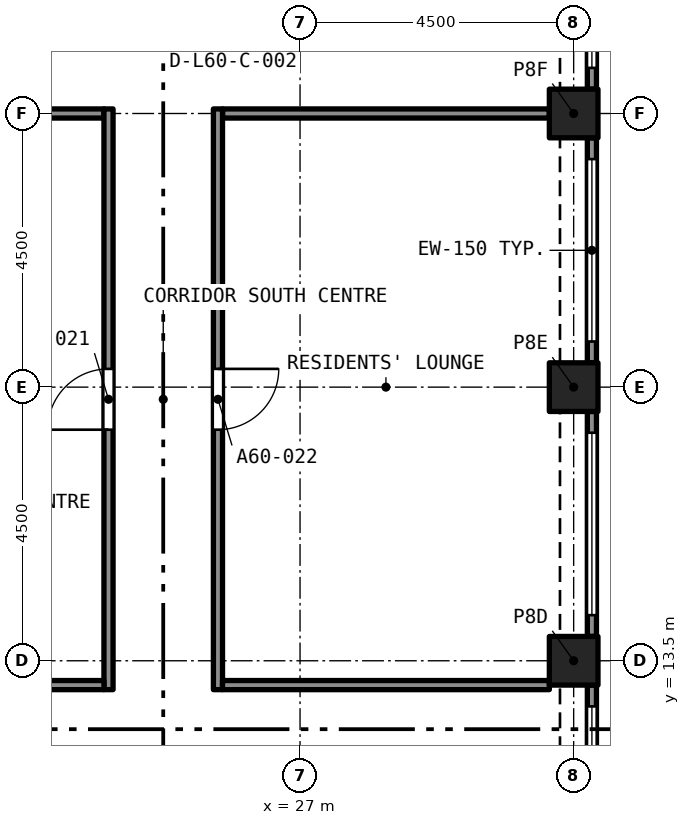
"""IFC4 building model, lengths in metres.
Left out: names, types, materials, properties, quantities, classifications, styles, units other than length and angle.
Written with IfcOpenShell. Run it as: python <this file> out.ifc"""

import sys

from ifc_helpers import new_model, si_unit, direction, frame, frame_2d, origin, origin_2d, place, context, subcontext, project, spatial, rectangle, extrude, element, fill, save


model = new_model("IFC4")
c1 = context("Model", 3, precision=1e-05, world=origin(), true_north=direction((0.0, 1.0)))
c2 = subcontext(c1, "Body", "Model", "MODEL_VIEW")
j1 = project(units=[si_unit("LENGTHUNIT", "METRE"), si_unit("PLANEANGLEUNIT", "RADIAN")], contexts=[c1])
p1 = place(None, origin())
s1 = spatial("IfcSite", under=j1, at=p1, CompositionType="ELEMENT")
p2 = place(p1, origin())
s2 = spatial("IfcBuilding", under=s1, at=p2, CompositionType="ELEMENT")
p3 = place(p2, frame((0.0, 0.0, 216.495)))
s3 = spatial("IfcBuildingStorey", under=s2, at=p3, CompositionType="ELEMENT", Elevation=216.495)
for number, where, z_axis, x_axis in (
    (1, (31.5, 13.5, 0.0), (0.0, 0.0, 1.0), (1.0, 0.0, 0.0)),
    (2, (31.5, 18.0, 0.0), (0.0, 0.0, 1.0), (1.0, 0.0, 0.0)),
    (3, (31.5, 22.5, 0.0), (0.0, 0.0, 1.0), (1.0, 0.0, 0.0)),
):
    element("IfcColumn", number, at=place(p3, frame(where, z_axis=z_axis, x_axis=x_axis)), inside=s3, PredefinedType="COLUMN", context=c2, shape_type="SweptSolid", body=[
        extrude(rectangle(XDim=0.8, YDim=0.8, at=origin_2d()), origin(), (0.0, 0.0, 1.0), 3.2),
    ])
p4 = place(p3, frame((31.8, 13.1, 0.0), z_axis=(0.0, 0.0, 1.0), x_axis=(0.0, -1.0, 0.0)))
e4 = element("IfcWall", 4, at=p4, inside=s3, PredefinedType="SOLIDWALL", context=c2, shape_type="SweptSolid", body=[
    extrude(rectangle(XDim=3.7, YDim=0.15, at=frame_2d((1.85, 0.0))), origin(), (0.0, 0.0, 1.0), 3.2),
])
p5 = place(p4, frame((0.35, 0.0, 0.45)))
e5 = element("IfcOpeningElement", 5, at=p5, cuts=e4, PredefinedType="OPENING", context=c2, shape_type="SweptSolid", body=[
    extrude(rectangle(XDim=3.0, YDim=1.95, at=frame_2d((1.5, 0.975))), frame((0.0, 0.085, 0.0), z_axis=(0.0, -1.0, 0.0), x_axis=(1.0, 0.0, 0.0)), (0.0, 0.0, 1.0), 0.17),
])
p6 = place(p3, frame((31.8, 17.6, 0.0), z_axis=(0.0, 0.0, 1.0), x_axis=(0.0, -1.0, 0.0)))
e6 = element("IfcWall", 6, at=p6, inside=s3, PredefinedType="SOLIDWALL", context=c2, shape_type="SweptSolid", body=[
    extrude(rectangle(XDim=3.7, YDim=0.15, at=frame_2d((1.85, 0.0))), origin(), (0.0, 0.0, 1.0), 3.2),
])
p7 = place(p6, frame((0.35, 0.0, 0.45)))
e7 = element("IfcOpeningElement", 7, at=p7, cuts=e6, PredefinedType="OPENING", context=c2, shape_type="SweptSolid", body=[
    extrude(rectangle(XDim=3.0, YDim=1.95, at=frame_2d((1.5, 0.975))), frame((0.0, 0.085, 0.0), z_axis=(0.0, -1.0, 0.0), x_axis=(1.0, 0.0, 0.0)), (0.0, 0.0, 1.0), 0.17),
])
p8 = place(p3, frame((31.8, 22.1, 0.0), z_axis=(0.0, 0.0, 1.0), x_axis=(0.0, -1.0, 0.0)))
e8 = element("IfcWall", 8, at=p8, inside=s3, PredefinedType="SOLIDWALL", context=c2, shape_type="SweptSolid", body=[
    extrude(rectangle(XDim=3.7, YDim=0.15, at=frame_2d((1.85, 0.0))), origin(), (0.0, 0.0, 1.0), 3.2),
])
p9 = place(p8, frame((0.35, 0.0, 0.45)))
e9 = element("IfcOpeningElement", 9, at=p9, cuts=e8, PredefinedType="OPENING", context=c2, shape_type="SweptSolid", body=[
    extrude(rectangle(XDim=3.0, YDim=1.95, at=frame_2d((1.5, 0.975))), frame((0.0, 0.085, 0.0), z_axis=(0.0, -1.0, 0.0), x_axis=(1.0, 0.0, 0.0)), (0.0, 0.0, 1.0), 0.17),
])
p10 = place(p3, frame((31.8, 26.6, 0.0), z_axis=(0.0, 0.0, 1.0), x_axis=(0.0, -1.0, 0.0)))
e10 = element("IfcWall", 10, at=p10, inside=s3, PredefinedType="SOLIDWALL", context=c2, shape_type="SweptSolid", body=[
    extrude(rectangle(XDim=3.7, YDim=0.15, at=frame_2d((1.85, 0.0))), origin(), (0.0, 0.0, 1.0), 3.2),
])
p11 = place(p10, frame((0.35, 0.0, 0.45)))
e11 = element("IfcOpeningElement", 11, at=p11, cuts=e10, PredefinedType="OPENING", context=c2, shape_type="SweptSolid", body=[
    extrude(rectangle(XDim=3.0, YDim=1.95, at=frame_2d((1.5, 0.975))), frame((0.0, 0.085, 0.0), z_axis=(0.0, -1.0, 0.0), x_axis=(1.0, 0.0, 0.0)), (0.0, 0.0, 1.0), 0.17),
])
for number, where, z_axis, x_axis in (
    (12, (18.4, 22.5, 0.0), (0.0, 0.0, 1.0), (1.0, 0.0, 0.0)),
    (13, (25.725, 22.5, 0.0), (0.0, 0.0, 1.0), (1.0, 0.0, 0.0)),
):
    element("IfcWall", number, at=place(p3, frame(where, z_axis=z_axis, x_axis=x_axis)), inside=s3, PredefinedType="PARTITIONING", context=c2, shape_type="SweptSolid", body=[
        extrude(rectangle(XDim=5.375, YDim=0.15, at=frame_2d((2.688, 0.0))), origin(), (0.0, 0.0, 1.0), 2.75),
    ])
p12 = place(p3, frame((23.85, 13.025, 0.0), z_axis=(0.0, 0.0, 1.0), x_axis=(0.0, 1.0, 0.0)))
e14 = element("IfcWall", 14, at=p12, inside=s3, PredefinedType="PARTITIONING", context=c2, shape_type="SweptSolid", body=[
    extrude(rectangle(XDim=9.55, YDim=0.15, at=frame_2d((4.775, 0.0))), origin(), (0.0, 0.0, 1.0), 2.75),
])
p13 = place(p12, frame((4.275, 0.0, 0.0)))
e15 = element("IfcOpeningElement", 15, at=p13, cuts=e14, PredefinedType="OPENING", context=c2, shape_type="SweptSolid", body=[
    extrude(rectangle(XDim=1.0, YDim=2.1, at=frame_2d((0.5, 1.05))), frame((0.0, 0.085, 0.0), z_axis=(0.0, -1.0, 0.0), x_axis=(1.0, 0.0, 0.0)), (0.0, 0.0, 1.0), 0.17),
])
p14 = place(p3, frame((25.65, 22.575, 0.0), z_axis=(0.0, 0.0, 1.0), x_axis=(0.0, -1.0, 0.0)))
e16 = element("IfcWall", 16, at=p14, inside=s3, PredefinedType="PARTITIONING", context=c2, shape_type="SweptSolid", body=[
    extrude(rectangle(XDim=9.55, YDim=0.15, at=frame_2d((4.775, 0.0))), origin(), (0.0, 0.0, 1.0), 2.75),
])
p15 = place(p14, frame((4.275, 0.0, 0.0)))
e17 = element("IfcOpeningElement", 17, at=p15, cuts=e16, PredefinedType="OPENING", context=c2, shape_type="SweptSolid", body=[
    extrude(rectangle(XDim=1.0, YDim=2.1, at=frame_2d((0.5, 1.05))), frame((0.0, 0.085, 0.0), z_axis=(0.0, -1.0, 0.0), x_axis=(1.0, 0.0, 0.0)), (0.0, 0.0, 1.0), 0.17),
])
for number, where, z_axis, x_axis in (
    (18, (18.4, 13.1, 0.0), (0.0, 0.0, 1.0), (1.0, 0.0, 0.0)),
    (19, (25.725, 13.1, 0.0), (0.0, 0.0, 1.0), (1.0, 0.0, 0.0)),
):
    element("IfcWall", number, at=place(p3, frame(where, z_axis=z_axis, x_axis=x_axis)), inside=s3, PredefinedType="PARTITIONING", context=c2, shape_type="SweptSolid", body=[
        extrude(rectangle(XDim=5.375, YDim=0.15, at=frame_2d((2.688, 0.0))), origin(), (0.0, 0.0, 1.0), 2.75),
    ])
p16 = place(p5, origin())
e20 = element("IfcWindow", 20, at=p16, inside=s3, PartitioningType="SINGLE_PANEL", PredefinedType="WINDOW", context=c2, shape_type="SweptSolid", body=[
    extrude(rectangle(XDim=3.0, YDim=1.95, at=frame_2d((1.5, 0.975))), frame((0.0, 0.03, 0.0), z_axis=(0.0, -1.0, 0.0), x_axis=(1.0, 0.0, 0.0)), (0.0, 0.0, 1.0), 0.06),
])
fill(e5, e20)
p17 = place(p7, origin())
e21 = element("IfcWindow", 21, at=p17, inside=s3, PartitioningType="SINGLE_PANEL", PredefinedType="WINDOW", context=c2, shape_type="SweptSolid", body=[
    extrude(rectangle(XDim=3.0, YDim=1.95, at=frame_2d((1.5, 0.975))), frame((0.0, 0.03, 0.0), z_axis=(0.0, -1.0, 0.0), x_axis=(1.0, 0.0, 0.0)), (0.0, 0.0, 1.0), 0.06),
])
fill(e7, e21)
p18 = place(p9, origin())
e22 = element("IfcWindow", 22, at=p18, inside=s3, PartitioningType="SINGLE_PANEL", PredefinedType="WINDOW", context=c2, shape_type="SweptSolid", body=[
    extrude(rectangle(XDim=3.0, YDim=1.95, at=frame_2d((1.5, 0.975))), frame((0.0, 0.03, 0.0), z_axis=(0.0, -1.0, 0.0), x_axis=(1.0, 0.0, 0.0)), (0.0, 0.0, 1.0), 0.06),
])
fill(e9, e22)
p19 = place(p11, origin())
e23 = element("IfcWindow", 23, at=p19, inside=s3, PartitioningType="SINGLE_PANEL", PredefinedType="WINDOW", context=c2, shape_type="SweptSolid", body=[
    extrude(rectangle(XDim=3.0, YDim=1.95, at=frame_2d((1.5, 0.975))), frame((0.0, 0.03, 0.0), z_axis=(0.0, -1.0, 0.0), x_axis=(1.0, 0.0, 0.0)), (0.0, 0.0, 1.0), 0.06),
])
fill(e11, e23)
p20 = place(p13, origin())
e24 = element("IfcDoor", 24, at=p20, inside=s3, OperationType="SINGLE_SWING_RIGHT", PredefinedType="DOOR", context=c2, shape_type="SweptSolid", body=[
    extrude(rectangle(XDim=1.0, YDim=2.1, at=frame_2d((0.5, 1.05))), frame((0.0, 0.025, 0.0), z_axis=(0.0, -1.0, 0.0), x_axis=(1.0, 0.0, 0.0)), (0.0, 0.0, 1.0), 0.05),
])
fill(e15, e24)
p21 = place(p15, origin())
e25 = element("IfcDoor", 25, at=p21, inside=s3, OperationType="SINGLE_SWING_LEFT", PredefinedType="DOOR", context=c2, shape_type="SweptSolid", body=[
    extrude(rectangle(XDim=1.0, YDim=2.1, at=frame_2d((0.5, 1.05))), frame((0.0, 0.025, 0.0), z_axis=(0.0, -1.0, 0.0), x_axis=(1.0, 0.0, 0.0)), (0.0, 0.0, 1.0), 0.05),
])
fill(e17, e25)
save(model, sys.argv[1])
